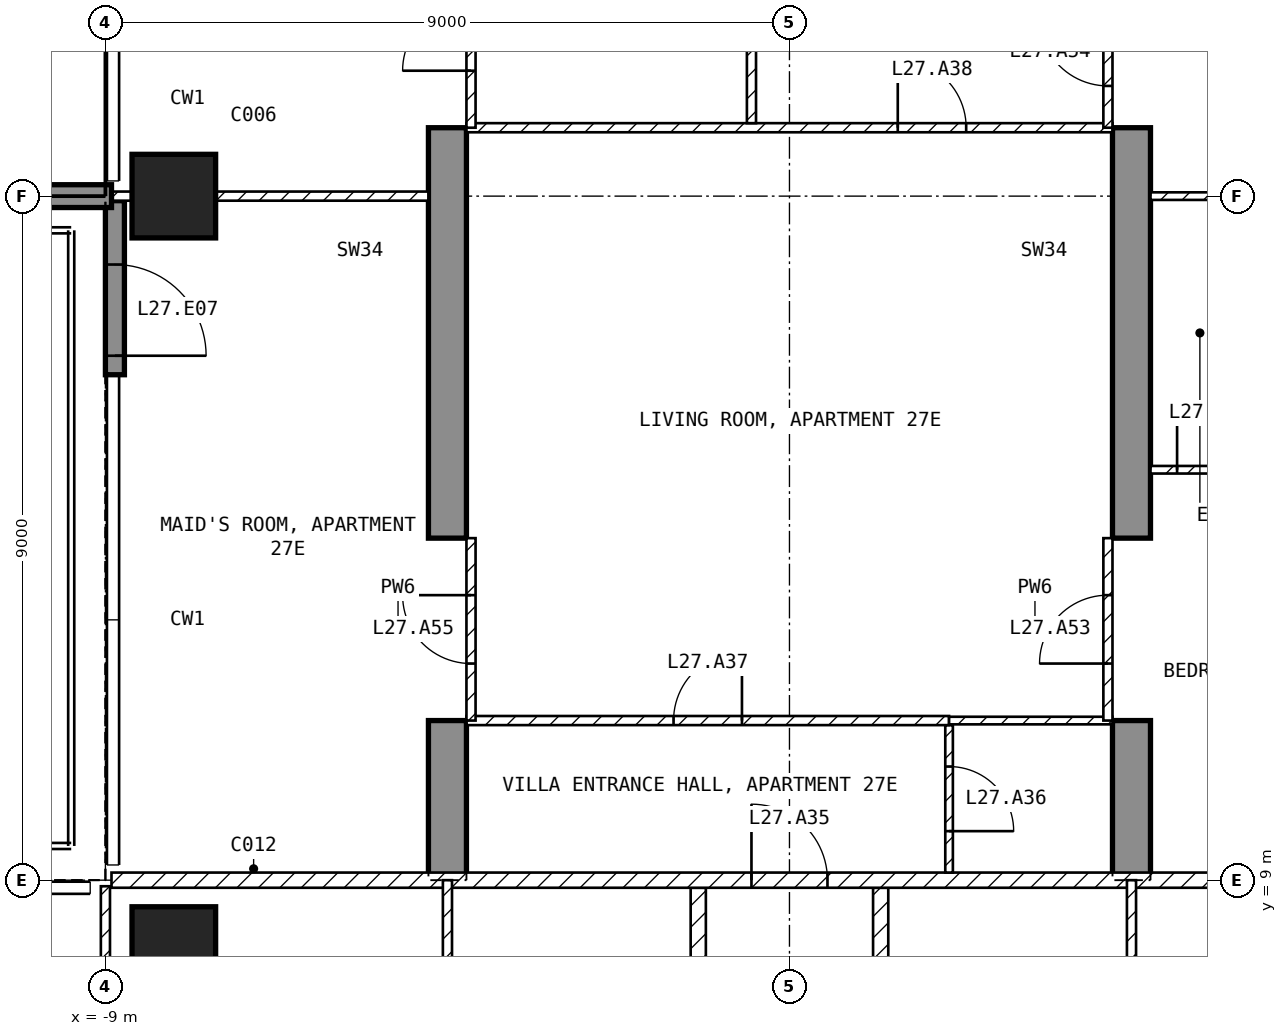
"""IFC4 building model, lengths in metres.
Left out: names, types, materials, properties, quantities, classifications, styles, units other than length and angle.
Written with IfcOpenShell. Run it as: python <this file> out.ifc"""

import sys

from ifc_helpers import new_model, si_unit, direction, frame, frame_2d, origin, origin_2d, place, context, subcontext, project, spatial, polyline, rectangle, outline, extrude, element, fill, save


model = new_model("IFC4")
c1 = context("Model", 3, precision=1e-05, world=origin(), true_north=direction((0.0, 1.0)))
c2 = subcontext(c1, "Body", "Model", "MODEL_VIEW")
j1 = project(units=[si_unit("LENGTHUNIT", "METRE"), si_unit("PLANEANGLEUNIT", "RADIAN")], contexts=[c1])
p1 = place(None, origin())
s1 = spatial("IfcSite", under=j1, at=p1, CompositionType="ELEMENT")
p2 = place(p1, origin())
s2 = spatial("IfcBuilding", under=s1, at=p2, CompositionType="ELEMENT")
p3 = place(p2, frame((0.0, 0.0, 116.4)))
s3 = spatial("IfcBuildingStorey", under=s2, at=p3, CompositionType="ELEMENT", Elevation=116.4)
for number, where, z_axis, x_axis in (
    (1, (-8.1, 8.1, -0.25), (0.0, 0.0, 1.0), (1.0, 0.0, 0.0)),
    (2, (-8.1, 18.0, -0.25), (0.0, 0.0, 1.0), (1.0, 0.0, 0.0)),
):
    element("IfcColumn", number, at=place(p3, frame(where, z_axis=z_axis, x_axis=x_axis)), inside=s3, PredefinedType="COLUMN", context=c2, shape_type="SweptSolid", body=[
        extrude(rectangle(XDim=1.1, YDim=1.1, at=origin_2d()), origin(), (0.0, 0.0, 1.0), 3.5),
    ])
for number, where, z_axis, x_axis in (
    (3, (-4.75, 9.0, -0.25), (1.0, 0.0, 0.0), (0.0, 1.0, 0.0)),
    (4, (4.25, 9.0, -0.25), (1.0, 0.0, 0.0), (0.0, 1.0, 0.0)),
):
    element("IfcWall", number, at=place(p3, frame(where, z_axis=z_axis, x_axis=x_axis)), inside=s3, PredefinedType="SHEAR", context=c2, shape_type="SweptSolid", body=[
        extrude(outline(polyline([(0.0, 0.0), (2.1, 0.0), (2.1, 2.65), (4.5, 2.65), (4.5, 0.0), (9.9, 0.0), (9.9, 2.65), (12.3, 2.65), (12.3, 0.0), (16.55, 0.0), (16.55, 3.5), (0.0, 3.5), (0.0, 0.0)])), origin(), (0.0, 0.0, 1.0), 0.5),
    ])
p4 = place(p3, frame((-8.875, 17.94, 0.0), z_axis=(0.0, 0.0, 1.0), x_axis=(0.0, -1.0, 0.0)))
e5 = element("IfcWall", 5, at=p4, inside=s3, PredefinedType="SOLIDWALL", context=c2, shape_type="SweptSolid", body=[
    extrude(rectangle(XDim=2.29, YDim=0.25, at=frame_2d((1.145, 0.0))), origin(), (0.0, 0.0, 1.0), 3.25),
])
p5 = place(p4, frame((0.84, 0.0, 0.0)))
e6 = element("IfcOpeningElement", 6, at=p5, cuts=e5, PredefinedType="OPENING", context=c2, shape_type="SweptSolid", body=[
    extrude(rectangle(XDim=1.2, YDim=2.4, at=frame_2d((0.6, 1.2))), frame((0.0, 0.135, 0.0), z_axis=(0.0, -1.0, 0.0), x_axis=(1.0, 0.0, 0.0)), (0.0, 0.0, 1.0), 0.27),
])
p6 = place(p3, frame((-8.92, 18.0, 0.0), z_axis=(0.0, 0.0, 1.0), x_axis=(-1.0, 0.0, 0.0)))
e7 = element("IfcWall", 7, at=p6, inside=s3, PredefinedType="SOLIDWALL", context=c2, shape_type="SweptSolid", body=[
    extrude(rectangle(XDim=2.82, YDim=0.3, at=frame_2d((1.41, 0.0))), origin(), (0.0, 0.0, 1.0), 3.25),
])
for number, where, z_axis, x_axis in (
    (8, (1.2, 8.9, 0.0), (0.0, 0.0, 1.0), (0.0, -1.0, 0.0)),
    (9, (-1.2, 4.6, 0.0), (0.0, 0.0, 1.0), (0.0, 1.0, 0.0)),
):
    element("IfcWall", number, at=place(p3, frame(where, z_axis=z_axis, x_axis=x_axis)), inside=s3, PredefinedType="PARTITIONING", context=c2, shape_type="SweptSolid", body=[
        extrude(rectangle(XDim=4.3, YDim=0.2, at=frame_2d((2.15, 0.0))), origin(), (0.0, 0.0, 1.0), 3.25),
    ])
p7 = place(p3, frame((-8.92, 9.0, 0.0), z_axis=(0.0, 0.0, 1.0), x_axis=(1.0, 0.0, 0.0)))
e10 = element("IfcWall", 10, at=p7, inside=s3, PredefinedType="PARTITIONING", context=c2, shape_type="SweptSolid", body=[
    extrude(rectangle(XDim=17.84, YDim=0.2, at=frame_2d((8.92, 0.0))), origin(), (0.0, 0.0, 1.0), 3.25),
])
p8 = place(p7, frame((8.42, 0.0, 0.0)))
e11 = element("IfcOpeningElement", 11, at=p8, cuts=e10, PredefinedType="OPENING", context=c2, shape_type="SweptSolid", body=[
    extrude(rectangle(XDim=1.0, YDim=2.1, at=frame_2d((0.5, 1.05))), frame((0.0, 0.11, 0.0), z_axis=(0.0, -1.0, 0.0), x_axis=(1.0, 0.0, 0.0)), (0.0, 0.0, 1.0), 0.22),
])
p9 = place(p3, frame((4.5, 4.5, 0.0), z_axis=(0.0, 0.0, 1.0), x_axis=(0.0, 1.0, 0.0)))
e12 = element("IfcWall", 12, at=p9, inside=s3, PredefinedType="PARTITIONING", context=c2, shape_type="SweptSolid", body=[
    extrude(rectangle(XDim=4.5, YDim=0.12, at=frame_2d((2.25, 0.0))), origin(), (0.0, 0.0, 1.0), 3.25),
])
p10 = place(p9, frame((0.24, 0.0, 0.0)))
e13 = element("IfcOpeningElement", 13, at=p10, cuts=e12, PredefinedType="OPENING", context=c2, shape_type="SweptSolid", body=[
    extrude(rectangle(XDim=0.9, YDim=2.1, at=frame_2d((0.45, 1.05))), frame((0.0, 0.07, 0.0), z_axis=(0.0, -1.0, 0.0), x_axis=(1.0, 0.0, 0.0)), (0.0, 0.0, 1.0), 0.14),
])
p11 = place(p3, frame((-9.0, 8.92, 0.0), z_axis=(0.0, 0.0, 1.0), x_axis=(0.0, -1.0, 0.0)))
e14 = element("IfcWall", 14, at=p11, inside=s3, PredefinedType="PARTITIONING", context=c2, shape_type="SweptSolid", body=[
    extrude(rectangle(XDim=7.62, YDim=0.12, at=frame_2d((3.81, 0.0))), origin(), (0.0, 0.0, 1.0), 3.25),
])
p12 = place(p11, frame((2.52, 0.0, 0.0)))
e15 = element("IfcOpeningElement", 15, at=p12, cuts=e14, PredefinedType="OPENING", context=c2, shape_type="SweptSolid", body=[
    extrude(rectangle(XDim=0.9, YDim=2.1, at=frame_2d((0.45, 1.05))), frame((0.0, 0.07, 0.0), z_axis=(0.0, -1.0, 0.0), x_axis=(1.0, 0.0, 0.0)), (0.0, 0.0, 1.0), 0.14),
])
p13 = place(p3, frame((-4.5, 9.0, 0.0), z_axis=(0.0, 0.0, 1.0), x_axis=(0.0, -1.0, 0.0)))
e16 = element("IfcWall", 16, at=p13, inside=s3, PredefinedType="PARTITIONING", context=c2, shape_type="SweptSolid", body=[
    extrude(rectangle(XDim=4.5, YDim=0.12, at=frame_2d((2.25, 0.0))), origin(), (0.0, 0.0, 1.0), 3.25),
])
p14 = place(p13, frame((1.8, 0.0, 0.0)))
e17 = element("IfcOpeningElement", 17, at=p14, cuts=e16, PredefinedType="OPENING", context=c2, shape_type="SweptSolid", body=[
    extrude(rectangle(XDim=0.9, YDim=2.1, at=frame_2d((0.45, 1.05))), frame((0.0, 0.07, 0.0), z_axis=(0.0, -1.0, 0.0), x_axis=(1.0, 0.0, 0.0)), (0.0, 0.0, 1.0), 0.14),
])
p15 = place(p3, frame((2.1, 11.04, 0.0), z_axis=(0.0, 0.0, 1.0), x_axis=(0.0, -1.0, 0.0)))
e18 = element("IfcWall", 18, at=p15, inside=s3, PredefinedType="PARTITIONING", context=c2, shape_type="SweptSolid", body=[
    extrude(rectangle(XDim=1.94, YDim=0.1, at=frame_2d((0.97, 0.0))), origin(), (0.0, 0.0, 1.0), 3.25),
])
p16 = place(p15, frame((0.545, 0.0, 0.0)))
e19 = element("IfcOpeningElement", 19, at=p16, cuts=e18, PredefinedType="OPENING", context=c2, shape_type="SweptSolid", body=[
    extrude(rectangle(XDim=0.85, YDim=2.1, at=frame_2d((0.425, 1.05))), frame((0.0, 0.06, 0.0), z_axis=(0.0, -1.0, 0.0), x_axis=(1.0, 0.0, 0.0)), (0.0, 0.0, 1.0), 0.12),
])
p17 = place(p3, frame((-4.25, 11.1, 0.0), z_axis=(0.0, 0.0, 1.0), x_axis=(1.0, 0.0, 0.0)))
e20 = element("IfcWall", 20, at=p17, inside=s3, PredefinedType="PARTITIONING", context=c2, shape_type="SweptSolid", body=[
    extrude(rectangle(XDim=6.35, YDim=0.12, at=frame_2d((3.175, 0.0))), origin(), (0.0, 0.0, 1.0), 3.25),
])
p18 = place(p17, frame((2.725, 0.0, 0.0)))
e21 = element("IfcOpeningElement", 21, at=p18, cuts=e20, PredefinedType="OPENING", context=c2, shape_type="SweptSolid", body=[
    extrude(rectangle(XDim=0.9, YDim=2.1, at=frame_2d((0.45, 1.05))), frame((0.0, 0.07, 0.0), z_axis=(0.0, -1.0, 0.0), x_axis=(1.0, 0.0, 0.0)), (0.0, 0.0, 1.0), 0.14),
])
p19 = place(p3, frame((2.1, 11.1, 0.0), z_axis=(0.0, 0.0, 1.0), x_axis=(1.0, 0.0, 0.0)))
e22 = element("IfcWall", 22, at=p19, inside=s3, PredefinedType="PARTITIONING", context=c2, shape_type="SweptSolid", body=[
    extrude(rectangle(XDim=2.15, YDim=0.1, at=frame_2d((1.075, 0.0))), origin(), (0.0, 0.0, 1.0), 3.25),
])
p20 = place(p3, frame((-4.25, 18.9, 0.0), z_axis=(0.0, 0.0, 1.0), x_axis=(1.0, 0.0, 0.0)))
e23 = element("IfcWall", 23, at=p20, inside=s3, PredefinedType="PARTITIONING", context=c2, shape_type="SweptSolid", body=[
    extrude(rectangle(XDim=8.5, YDim=0.12, at=frame_2d((4.25, 0.0))), origin(), (0.0, 0.0, 1.0), 3.25),
])
p21 = place(p20, frame((5.675, 0.0, 0.0)))
e24 = element("IfcOpeningElement", 24, at=p21, cuts=e23, PredefinedType="OPENING", context=c2, shape_type="SweptSolid", body=[
    extrude(rectangle(XDim=0.9, YDim=2.1, at=frame_2d((0.45, 1.05))), frame((0.0, 0.07, 0.0), z_axis=(0.0, -1.0, 0.0), x_axis=(1.0, 0.0, 0.0)), (0.0, 0.0, 1.0), 0.14),
])
p22 = place(p3, frame((-0.5, 18.96, 0.0), z_axis=(0.0, 0.0, 1.0), x_axis=(0.0, 1.0, 0.0)))
e25 = element("IfcWall", 25, at=p22, inside=s3, PredefinedType="PARTITIONING", context=c2, shape_type="SweptSolid", body=[
    extrude(rectangle(XDim=4.38, YDim=0.12, at=frame_2d((2.19, 0.0))), origin(), (0.0, 0.0, 1.0), 3.25),
])
p23 = place(p22, frame((1.74, 0.0, 0.0)))
e26 = element("IfcOpeningElement", 26, at=p23, cuts=e25, PredefinedType="OPENING", context=c2, shape_type="SweptSolid", body=[
    extrude(rectangle(XDim=0.9, YDim=2.1, at=frame_2d((0.45, 1.05))), frame((0.0, 0.07, 0.0), z_axis=(0.0, -1.0, 0.0), x_axis=(1.0, 0.0, 0.0)), (0.0, 0.0, 1.0), 0.14),
])
p24 = place(p3, frame((4.75, 14.4, 0.0), z_axis=(0.0, 0.0, 1.0), x_axis=(1.0, 0.0, 0.0)))
e27 = element("IfcWall", 27, at=p24, inside=s3, PredefinedType="PARTITIONING", context=c2, shape_type="SweptSolid", body=[
    extrude(rectangle(XDim=1.6, YDim=0.1, at=frame_2d((0.8, 0.0))), origin(), (0.0, 0.0, 1.0), 3.25),
])
p25 = place(p24, frame((0.35, 0.0, 0.0)))
e28 = element("IfcOpeningElement", 28, at=p25, cuts=e27, PredefinedType="OPENING", context=c2, shape_type="SweptSolid", body=[
    extrude(rectangle(XDim=0.85, YDim=2.1, at=frame_2d((0.425, 1.05))), frame((0.0, 0.06, 0.0), z_axis=(0.0, -1.0, 0.0), x_axis=(1.0, 0.0, 0.0)), (0.0, 0.0, 1.0), 0.12),
])
p26 = place(p3, frame((4.75, 18.0, 0.0), z_axis=(0.0, 0.0, 1.0), x_axis=(1.0, 0.0, 0.0)))
e29 = element("IfcWall", 29, at=p26, inside=s3, PredefinedType="PARTITIONING", context=c2, shape_type="SweptSolid", body=[
    extrude(rectangle(XDim=1.55, YDim=0.1, at=frame_2d((0.775, 0.0))), origin(), (0.0, 0.0, 1.0), 2.414),
])
p27 = place(p3, frame((-8.92, 18.0, 0.0), z_axis=(0.0, 0.0, 1.0), x_axis=(1.0, 0.0, 0.0)))
e30 = element("IfcWall", 30, at=p27, inside=s3, PredefinedType="PARTITIONING", context=c2, shape_type="SweptSolid", body=[
    extrude(rectangle(XDim=4.17, YDim=0.12, at=frame_2d((2.085, 0.0))), origin(), (0.0, 0.0, 1.0), 2.414),
])
p28 = place(p3, frame((4.19, 11.1, 0.0), z_axis=(0.0, 0.0, 1.0), x_axis=(0.0, 1.0, 0.0)))
e31 = element("IfcWall", 31, at=p28, inside=s3, PredefinedType="PARTITIONING", context=c2, shape_type="SweptSolid", body=[
    extrude(rectangle(XDim=2.4, YDim=0.12, at=frame_2d((1.2, 0.0))), origin(), (0.0, 0.0, 1.0), 2.4),
])
p29 = place(p28, frame((0.75, 0.0, 0.0)))
e32 = element("IfcOpeningElement", 32, at=p29, cuts=e31, PredefinedType="OPENING", context=c2, shape_type="SweptSolid", body=[
    extrude(rectangle(XDim=0.9, YDim=2.1, at=frame_2d((0.45, 1.05))), frame((0.0, 0.07, 0.0), z_axis=(0.0, -1.0, 0.0), x_axis=(1.0, 0.0, 0.0)), (0.0, 0.0, 1.0), 0.14),
])
p30 = place(p3, frame((4.19, 18.9, 0.0), z_axis=(0.0, 0.0, 1.0), x_axis=(0.0, 1.0, 0.0)))
e33 = element("IfcWall", 33, at=p30, inside=s3, PredefinedType="PARTITIONING", context=c2, shape_type="SweptSolid", body=[
    extrude(rectangle(XDim=2.4, YDim=0.12, at=frame_2d((1.2, 0.0))), origin(), (0.0, 0.0, 1.0), 2.4),
])
p31 = place(p30, frame((0.55, 0.0, 0.0)))
e34 = element("IfcOpeningElement", 34, at=p31, cuts=e33, PredefinedType="OPENING", context=c2, shape_type="SweptSolid", body=[
    extrude(rectangle(XDim=0.9, YDim=2.1, at=frame_2d((0.45, 1.05))), frame((0.0, 0.07, 0.0), z_axis=(0.0, -1.0, 0.0), x_axis=(1.0, 0.0, 0.0)), (0.0, 0.0, 1.0), 0.14),
])
p32 = place(p3, frame((-4.19, 11.1, 0.0), z_axis=(0.0, 0.0, 1.0), x_axis=(0.0, 1.0, 0.0)))
e35 = element("IfcWall", 35, at=p32, inside=s3, PredefinedType="PARTITIONING", context=c2, shape_type="SweptSolid", body=[
    extrude(rectangle(XDim=2.4, YDim=0.12, at=frame_2d((1.2, 0.0))), origin(), (0.0, 0.0, 1.0), 2.4),
])
p33 = place(p32, frame((0.75, 0.0, 0.0)))
e36 = element("IfcOpeningElement", 36, at=p33, cuts=e35, PredefinedType="OPENING", context=c2, shape_type="SweptSolid", body=[
    extrude(rectangle(XDim=0.9, YDim=2.1, at=frame_2d((0.45, 1.05))), frame((0.0, 0.07, 0.0), z_axis=(0.0, -1.0, 0.0), x_axis=(1.0, 0.0, 0.0)), (0.0, 0.0, 1.0), 0.14),
])
p34 = place(p3, frame((-4.19, 18.9, 0.0), z_axis=(0.0, 0.0, 1.0), x_axis=(0.0, 1.0, 0.0)))
e37 = element("IfcWall", 37, at=p34, inside=s3, PredefinedType="PARTITIONING", context=c2, shape_type="SweptSolid", body=[
    extrude(rectangle(XDim=2.4, YDim=0.12, at=frame_2d((1.2, 0.0))), origin(), (0.0, 0.0, 1.0), 2.4),
])
p35 = place(p34, frame((0.75, 0.0, 0.0)))
e38 = element("IfcOpeningElement", 38, at=p35, cuts=e37, PredefinedType="OPENING", context=c2, shape_type="SweptSolid", body=[
    extrude(rectangle(XDim=0.9, YDim=2.1, at=frame_2d((0.45, 1.05))), frame((0.0, 0.07, 0.0), z_axis=(0.0, -1.0, 0.0), x_axis=(1.0, 0.0, 0.0)), (0.0, 0.0, 1.0), 0.14),
])
p36 = place(p5, origin())
e39 = element("IfcDoor", 39, at=p36, inside=s3, OperationType="SINGLE_SWING_RIGHT", PredefinedType="DOOR", context=c2, shape_type="SweptSolid", body=[
    extrude(rectangle(XDim=1.2, YDim=2.4, at=frame_2d((0.6, 1.2))), frame((0.0, 0.025, 0.0), z_axis=(0.0, -1.0, 0.0), x_axis=(1.0, 0.0, 0.0)), (0.0, 0.0, 1.0), 0.05),
])
fill(e6, e39)
p37 = place(p8, origin())
e40 = element("IfcDoor", 40, at=p37, inside=s3, OperationType="SINGLE_SWING_LEFT", PredefinedType="DOOR", context=c2, shape_type="SweptSolid", body=[
    extrude(rectangle(XDim=1.0, YDim=2.1, at=frame_2d((0.5, 1.05))), frame((0.0, 0.025, 0.0), z_axis=(0.0, -1.0, 0.0), x_axis=(1.0, 0.0, 0.0)), (0.0, 0.0, 1.0), 0.05),
])
fill(e11, e40)
p38 = place(p16, origin())
e41 = element("IfcDoor", 41, at=p38, inside=s3, OperationType="SINGLE_SWING_RIGHT", PredefinedType="DOOR", context=c2, shape_type="SweptSolid", body=[
    extrude(rectangle(XDim=0.85, YDim=2.1, at=frame_2d((0.425, 1.05))), frame((0.0, 0.025, 0.0), z_axis=(0.0, -1.0, 0.0), x_axis=(1.0, 0.0, 0.0)), (0.0, 0.0, 1.0), 0.05),
])
fill(e19, e41)
p39 = place(p18, origin())
e42 = element("IfcDoor", 42, at=p39, inside=s3, OperationType="SINGLE_SWING_RIGHT", PredefinedType="DOOR", context=c2, shape_type="SweptSolid", body=[
    extrude(rectangle(XDim=0.9, YDim=2.1, at=frame_2d((0.45, 1.05))), frame((0.0, 0.025, 0.0), z_axis=(0.0, -1.0, 0.0), x_axis=(1.0, 0.0, 0.0)), (0.0, 0.0, 1.0), 0.05),
])
fill(e21, e42)
p40 = place(p21, origin())
e43 = element("IfcDoor", 43, at=p40, inside=s3, OperationType="SINGLE_SWING_LEFT", PredefinedType="DOOR", context=c2, shape_type="SweptSolid", body=[
    extrude(rectangle(XDim=0.9, YDim=2.1, at=frame_2d((0.45, 1.05))), frame((0.0, 0.025, 0.0), z_axis=(0.0, -1.0, 0.0), x_axis=(1.0, 0.0, 0.0)), (0.0, 0.0, 1.0), 0.05),
])
fill(e24, e43)
p41 = place(p25, origin())
e44 = element("IfcDoor", 44, at=p41, inside=s3, OperationType="SINGLE_SWING_LEFT", PredefinedType="DOOR", context=c2, shape_type="SweptSolid", body=[
    extrude(rectangle(XDim=0.85, YDim=2.1, at=frame_2d((0.425, 1.05))), frame((0.0, 0.025, 0.0), z_axis=(0.0, -1.0, 0.0), x_axis=(1.0, 0.0, 0.0)), (0.0, 0.0, 1.0), 0.05),
])
fill(e28, e44)
p42 = place(p29, origin())
e45 = element("IfcDoor", 45, at=p42, inside=s3, OperationType="SINGLE_SWING_LEFT", PredefinedType="DOOR", context=c2, shape_type="SweptSolid", body=[
    extrude(rectangle(XDim=0.9, YDim=2.1, at=frame_2d((0.45, 1.05))), frame((0.0, 0.025, 0.0), z_axis=(0.0, -1.0, 0.0), x_axis=(1.0, 0.0, 0.0)), (0.0, 0.0, 1.0), 0.05),
])
fill(e32, e45)
p43 = place(p31, origin())
e46 = element("IfcDoor", 46, at=p43, inside=s3, OperationType="SINGLE_SWING_RIGHT", PredefinedType="DOOR", context=c2, shape_type="SweptSolid", body=[
    extrude(rectangle(XDim=0.9, YDim=2.1, at=frame_2d((0.45, 1.05))), frame((0.0, 0.025, 0.0), z_axis=(0.0, -1.0, 0.0), x_axis=(1.0, 0.0, 0.0)), (0.0, 0.0, 1.0), 0.05),
])
fill(e34, e46)
p44 = place(p33, origin())
e47 = element("IfcDoor", 47, at=p44, inside=s3, OperationType="SINGLE_SWING_RIGHT", PredefinedType="DOOR", context=c2, shape_type="SweptSolid", body=[
    extrude(rectangle(XDim=0.9, YDim=2.1, at=frame_2d((0.45, 1.05))), frame((0.0, 0.025, 0.0), z_axis=(0.0, -1.0, 0.0), x_axis=(1.0, 0.0, 0.0)), (0.0, 0.0, 1.0), 0.05),
])
fill(e36, e47)
p45 = place(p35, origin())
e48 = element("IfcDoor", 48, at=p45, inside=s3, OperationType="SINGLE_SWING_LEFT", PredefinedType="DOOR", context=c2, shape_type="SweptSolid", body=[
    extrude(rectangle(XDim=0.9, YDim=2.1, at=frame_2d((0.45, 1.05))), frame((0.0, 0.025, 0.0), z_axis=(0.0, -1.0, 0.0), x_axis=(1.0, 0.0, 0.0)), (0.0, 0.0, 1.0), 0.05),
])
fill(e38, e48)
save(model, sys.argv[1])
